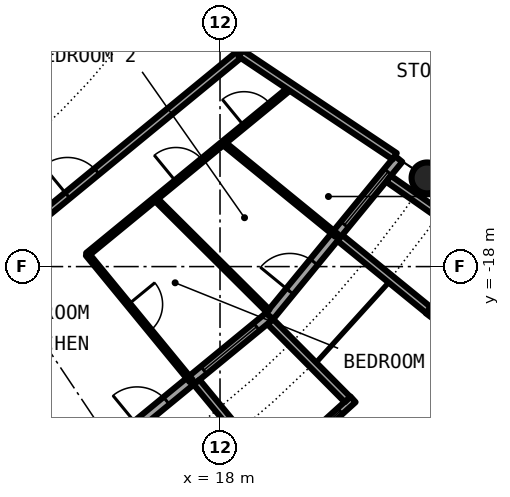
"""IFC4 building model, lengths in metres.
Left out: names, types, materials, properties, quantities, classifications, styles, units other than length and angle.
Written with IfcOpenShell. Run it as: python <this file> out.ifc"""

import sys

from ifc_helpers import new_model, si_unit, direction, frame, frame_2d, origin, origin_2d, place, context, subcontext, project, spatial, rectangle, circle, hollow_circle, extrude, element, fill, save


model = new_model("IFC4")
c1 = context("Model", 3, precision=1e-05, world=origin(), true_north=direction((0.0, 1.0)))
c2 = subcontext(c1, "Body", "Model", "MODEL_VIEW")
j1 = project(units=[si_unit("LENGTHUNIT", "METRE"), si_unit("PLANEANGLEUNIT", "RADIAN")], contexts=[c1])
p1 = place(None, origin())
s1 = spatial("IfcSite", under=j1, at=p1, CompositionType="ELEMENT")
p2 = place(p1, origin())
s2 = spatial("IfcBuilding", under=s1, at=p2, CompositionType="ELEMENT")
p3 = place(p2, frame((0.0, 0.0, 196.3)))
s3 = spatial("IfcBuildingStorey", under=s2, at=p3, CompositionType="ELEMENT", Elevation=196.3)
p4 = place(p3, frame((23.448, -15.667, 0.0), z_axis=(0.0, 0.0, 1.0), x_axis=(1.0, 0.0, 0.0)))
e1 = element("IfcColumn", 1, at=p4, inside=s3, PredefinedType="COLUMN", context=c2, shape_type="SweptSolid", body=[
    extrude(hollow_circle(Radius=0.406, WallThickness=0.03, at=origin_2d()), origin(), (0.0, 0.0, 1.0), 3.05),
])
p5 = place(p3, frame((15.167, -22.699, 0.0), z_axis=(0.0, 0.0, 1.0), x_axis=(0.773019449054, 0.634382322723, 0.0)))
e2 = element("IfcWall", 2, at=p5, inside=s3, PredefinedType="SOLIDWALL", context=c2, shape_type="SweptSolid", body=[
    extrude(rectangle(XDim=5.352, YDim=0.25, at=frame_2d((2.676, 0.0))), origin(), (0.0, 0.0, 1.0), 2.7),
])
p6 = place(p5, frame((0.841, 0.0, 0.0)))
e3 = element("IfcOpeningElement", 3, at=p6, cuts=e2, PredefinedType="OPENING", context=c2, shape_type="SweptSolid", body=[
    extrude(rectangle(XDim=1.0, YDim=2.2, at=frame_2d((0.5, 1.1))), frame((0.0, 0.135, 0.0), z_axis=(0.0, -1.0, 0.0), x_axis=(1.0, 0.0, 0.0)), (0.0, 0.0, 1.0), 0.27),
])
p7 = place(p5, frame((3.111, 0.0, 0.3)))
e4 = element("IfcOpeningElement", 4, at=p7, cuts=e2, PredefinedType="OPENING", context=c2, shape_type="SweptSolid", body=[
    extrude(rectangle(XDim=1.8, YDim=2.1, at=frame_2d((0.9, 1.05))), frame((0.0, 0.135, 0.0), z_axis=(0.0, -1.0, 0.0), x_axis=(1.0, 0.0, 0.0)), (0.0, 0.0, 1.0), 0.27),
])
p8 = place(p3, frame((19.282, -23.503, -0.03), z_axis=(0.0, 0.0, 1.0), x_axis=(0.740998365753, 0.671506829416, 0.0)))
e5 = element("IfcWall", 5, at=p8, inside=s3, PredefinedType="SOLIDWALL", context=c2, shape_type="SweptSolid", body=[
    extrude(rectangle(XDim=2.993, YDim=0.2, at=frame_2d((1.497, 0.0))), origin(), (0.0, 0.0, 1.0), 2.73),
])
p9 = place(p8, frame((0.457, 0.0, 0.33)))
e6 = element("IfcOpeningElement", 6, at=p9, cuts=e5, PredefinedType="OPENING", context=c2, shape_type="SweptSolid", body=[
    extrude(circle(Radius=1.04, at=frame_2d((1.04, 1.04))), frame((0.0, 0.11, 0.0), z_axis=(0.0, -1.0, 0.0), x_axis=(1.0, 0.0, 0.0)), (0.0, 0.0, 1.0), 0.22),
])
p10 = place(p3, frame((17.384, -21.041, -0.03), z_axis=(0.0, 0.0, 1.0), x_axis=(0.63709551667, -0.770784861449, 0.0)))
e7 = element("IfcWall", 7, at=p10, inside=s3, PredefinedType="SOLIDWALL", context=c2, shape_type="SweptSolid", body=[
    extrude(rectangle(XDim=3.006, YDim=0.2, at=frame_2d((1.503, 0.0))), origin(), (0.0, 0.0, 1.0), 2.73),
])
p11 = place(p3, frame((19.323, -19.45, -0.03), z_axis=(0.0, 0.0, 1.0), x_axis=(0.704476739375, -0.709727076896, 0.0)))
e8 = element("IfcWall", 8, at=p11, inside=s3, PredefinedType="SOLIDWALL", context=c2, shape_type="SweptSolid", body=[
    extrude(rectangle(XDim=2.883, YDim=0.2, at=frame_2d((1.441, 0.0))), origin(), (0.0, 0.0, 1.0), 2.73),
])
p12 = place(p3, frame((19.304, -19.304, 0.0), z_axis=(0.0, 0.0, 1.0), x_axis=(0.634382322723, 0.773019449054, 0.0)))
e9 = element("IfcWall", 9, at=p12, inside=s3, PredefinedType="SOLIDWALL", context=c2, shape_type="SweptSolid", body=[
    extrude(rectangle(XDim=5.352, YDim=0.25, at=frame_2d((2.676, 0.0))), origin(), (0.0, 0.0, 1.0), 2.7),
])
p13 = place(p12, frame((0.841, 0.0, 0.0)))
e10 = element("IfcOpeningElement", 10, at=p13, cuts=e9, PredefinedType="OPENING", context=c2, shape_type="SweptSolid", body=[
    extrude(rectangle(XDim=1.0, YDim=2.2, at=frame_2d((0.5, 1.1))), frame((0.0, 0.135, 0.0), z_axis=(0.0, -1.0, 0.0), x_axis=(1.0, 0.0, 0.0)), (0.0, 0.0, 1.0), 0.27),
])
p14 = place(p12, frame((3.111, 0.0, 0.3)))
e11 = element("IfcOpeningElement", 11, at=p14, cuts=e9, PredefinedType="OPENING", context=c2, shape_type="SweptSolid", body=[
    extrude(rectangle(XDim=1.8, YDim=2.1, at=frame_2d((0.9, 1.05))), frame((0.0, 0.135, 0.0), z_axis=(0.0, -1.0, 0.0), x_axis=(1.0, 0.0, 0.0)), (0.0, 0.0, 1.0), 0.27),
])
p15 = place(p3, frame((23.497, -19.289, -0.03), z_axis=(0.0, 0.0, 1.0), x_axis=(0.602806268067, 0.797887588059, 0.0)))
e12 = element("IfcWall", 12, at=p15, inside=s3, PredefinedType="SOLIDWALL", context=c2, shape_type="SweptSolid", body=[
    extrude(rectangle(XDim=2.447, YDim=0.2, at=frame_2d((1.223, 0.0))), origin(), (0.0, 0.0, 1.0), 2.73),
])
p16 = place(p15, frame((0.183, 0.0, 0.33)))
e13 = element("IfcOpeningElement", 13, at=p16, cuts=e12, PredefinedType="OPENING", context=c2, shape_type="SweptSolid", body=[
    extrude(circle(Radius=1.04, at=frame_2d((1.04, 1.04))), frame((0.0, 0.11, 0.0), z_axis=(0.0, -1.0, 0.0), x_axis=(1.0, 0.0, 0.0)), (0.0, 0.0, 1.0), 0.22),
])
p17 = place(p3, frame((21.155, -17.246, -0.03), z_axis=(0.0, 0.0, 1.0), x_axis=(0.775179004516, -0.631741648902, 0.0)))
e14 = element("IfcWall", 14, at=p17, inside=s3, PredefinedType="SOLIDWALL", context=c2, shape_type="SweptSolid", body=[
    extrude(rectangle(XDim=3.006, YDim=0.2, at=frame_2d((1.503, 0.0))), origin(), (0.0, 0.0, 1.0), 2.73),
])
p18 = place(p3, frame((22.433, -15.688, -0.03), z_axis=(0.0, 0.0, 1.0), x_axis=(0.819373043115, -0.573260687834, 0.0)))
e15 = element("IfcWall", 15, at=p18, inside=s3, PredefinedType="SOLIDWALL", context=c2, shape_type="SweptSolid", body=[
    extrude(rectangle(XDim=2.925, YDim=0.2, at=frame_2d((1.463, 0.0))), origin(), (0.0, 0.0, 1.0), 2.73),
])
p19 = place(p3, frame((14.508, -17.681, 0.0), z_axis=(0.0, 0.0, 1.0), x_axis=(0.773155647559, 0.634216323227, 0.0)))
e16 = element("IfcWall", 16, at=p19, inside=s3, PredefinedType="PARTITIONING", context=c2, shape_type="SweptSolid", body=[
    extrude(rectangle(XDim=6.939, YDim=0.1, at=frame_2d((3.469, 0.0))), origin(), (0.0, 0.0, 1.0), 2.7),
])
p20 = place(p19, frame((3.019, 0.0, 0.0)))
e17 = element("IfcOpeningElement", 17, at=p20, cuts=e16, PredefinedType="OPENING", context=c2, shape_type="SweptSolid", body=[
    extrude(rectangle(XDim=0.9, YDim=2.3, at=frame_2d((0.45, 1.15))), frame((0.0, 0.06, 0.0), z_axis=(0.0, -1.0, 0.0), x_axis=(1.0, 0.0, 0.0)), (0.0, 0.0, 1.0), 0.12),
])
p21 = place(p19, frame((5.334, 0.0, 0.0)))
e18 = element("IfcOpeningElement", 18, at=p21, cuts=e16, PredefinedType="OPENING", context=c2, shape_type="SweptSolid", body=[
    extrude(rectangle(XDim=0.9, YDim=2.3, at=frame_2d((0.45, 1.15))), frame((0.0, 0.06, 0.0), z_axis=(0.0, -1.0, 0.0), x_axis=(1.0, 0.0, 0.0)), (0.0, 0.0, 1.0), 0.12),
])
p22 = place(p3, frame((18.542, -12.389, 0.0), z_axis=(0.0, 0.0, 1.0), x_axis=(0.465359652486, 0.885121683068, 0.0)))
e19 = element("IfcWall", 19, at=p22, inside=s3, PredefinedType="PARTITIONING", context=c2, shape_type="SweptSolid", body=[
    extrude(rectangle(XDim=1.665, YDim=0.2, at=frame_2d((0.833, 0.0))), origin(), (0.0, 0.0, 1.0), 2.7),
])
p23 = place(p3, frame((8.534, -20.603, 0.0), z_axis=(0.0, 0.0, 1.0), x_axis=(0.772983503654, 0.634426121056, 0.0)))
e20 = element("IfcWall", 20, at=p23, inside=s3, PredefinedType="PARTITIONING", context=c2, shape_type="SweptSolid", body=[
    extrude(rectangle(XDim=12.947, YDim=0.2, at=frame_2d((6.474, 0.0))), origin(), (0.0, 0.0, 1.0), 2.7),
])
p24 = place(p23, frame((7.053, 0.0, 0.0)))
e21 = element("IfcOpeningElement", 21, at=p24, cuts=e20, PredefinedType="OPENING", context=c2, shape_type="SweptSolid", body=[
    extrude(rectangle(XDim=1.0, YDim=2.3, at=frame_2d((0.5, 1.15))), frame((0.0, 0.11, 0.0), z_axis=(0.0, -1.0, 0.0), x_axis=(1.0, 0.0, 0.0)), (0.0, 0.0, 1.0), 0.22),
])
p25 = place(p3, frame((6.773, -16.353, 0.0), z_axis=(0.0, 0.0, 1.0), x_axis=(0.773034536097, 0.634363938131, 0.0)))
e22 = element("IfcWall", 22, at=p25, inside=s3, PredefinedType="PARTITIONING", context=c2, shape_type="SweptSolid", body=[
    extrude(rectangle(XDim=10.277, YDim=0.2, at=frame_2d((5.138, 0.0))), origin(), (0.0, 0.0, 1.0), 2.7),
])
p26 = place(p25, frame((4.638, 0.0, 0.0)))
e23 = element("IfcOpeningElement", 23, at=p26, cuts=e22, PredefinedType="OPENING", context=c2, shape_type="SweptSolid", body=[
    extrude(rectangle(XDim=1.0, YDim=2.3, at=frame_2d((0.5, 1.15))), frame((0.0, 0.11, 0.0), z_axis=(0.0, -1.0, 0.0), x_axis=(1.0, 0.0, 0.0)), (0.0, 0.0, 1.0), 0.22),
])
p27 = place(p3, frame((14.509, -17.679, 0.0), z_axis=(0.0, 0.0, 1.0), x_axis=(0.634342681687, -0.77305197897, 0.0)))
e24 = element("IfcWall", 24, at=p27, inside=s3, PredefinedType="PARTITIONING", context=c2, shape_type="SweptSolid", body=[
    extrude(rectangle(XDim=4.305, YDim=0.1, at=frame_2d((2.153, 0.0))), origin(), (0.0, 0.0, 1.0), 2.7),
])
p28 = place(p27, frame((1.703, 0.0, 0.0)))
e25 = element("IfcOpeningElement", 25, at=p28, cuts=e24, PredefinedType="OPENING", context=c2, shape_type="SweptSolid", body=[
    extrude(rectangle(XDim=0.9, YDim=2.3, at=frame_2d((0.45, 1.15))), frame((0.0, 0.06, 0.0), z_axis=(0.0, -1.0, 0.0), x_axis=(1.0, 0.0, 0.0)), (0.0, 0.0, 1.0), 0.12),
])
p29 = place(p3, frame((16.296, -16.213, 0.0), z_axis=(0.0, 0.0, 1.0), x_axis=(0.708999026534, -0.705209458511, 0.0)))
e26 = element("IfcWall", 26, at=p29, inside=s3, PredefinedType="PARTITIONING", context=c2, shape_type="SweptSolid", body=[
    extrude(rectangle(XDim=4.188, YDim=0.1, at=frame_2d((2.094, 0.0))), origin(), (0.0, 0.0, 1.0), 2.7),
])
p30 = place(p3, frame((18.084, -14.745, 0.0), z_axis=(0.0, 0.0, 1.0), x_axis=(0.77495020745, -0.632022290724, 0.0)))
e27 = element("IfcWall", 27, at=p30, inside=s3, PredefinedType="PARTITIONING", context=c2, shape_type="SweptSolid", body=[
    extrude(rectangle(XDim=3.842, YDim=0.1, at=frame_2d((1.921, 0.0))), origin(), (0.0, 0.0, 1.0), 2.7),
])
p31 = place(p3, frame((18.542, -12.389, 0.0), z_axis=(0.0, 0.0, 1.0), x_axis=(0.831387096605, -0.55569370664, 0.0)))
e28 = element("IfcWall", 28, at=p31, inside=s3, PredefinedType="PARTITIONING", context=c2, shape_type="SweptSolid", body=[
    extrude(rectangle(XDim=4.875, YDim=0.2, at=frame_2d((2.438, 0.0))), origin(), (0.0, 0.0, 1.0), 2.7),
])
p32 = place(p6, origin())
e29 = element("IfcDoor", 29, at=p32, inside=s3, OperationType="SINGLE_SWING_LEFT", PredefinedType="DOOR", context=c2, shape_type="SweptSolid", body=[
    extrude(rectangle(XDim=1.0, YDim=2.2, at=frame_2d((0.5, 1.1))), frame((0.0, 0.025, 0.0), z_axis=(0.0, -1.0, 0.0), x_axis=(1.0, 0.0, 0.0)), (0.0, 0.0, 1.0), 0.05),
])
fill(e3, e29)
p33 = place(p7, origin())
e30 = element("IfcWindow", 30, at=p33, inside=s3, PartitioningType="SINGLE_PANEL", PredefinedType="WINDOW", context=c2, shape_type="SweptSolid", body=[
    extrude(rectangle(XDim=1.8, YDim=2.1, at=frame_2d((0.9, 1.05))), frame((0.0, 0.03, 0.0), z_axis=(0.0, -1.0, 0.0), x_axis=(1.0, 0.0, 0.0)), (0.0, 0.0, 1.0), 0.06),
])
fill(e4, e30)
p34 = place(p9, origin())
e31 = element("IfcWindow", 31, at=p34, inside=s3, PartitioningType="SINGLE_PANEL", PredefinedType="WINDOW", context=c2, shape_type="SweptSolid", body=[
    extrude(circle(Radius=1.04, at=frame_2d((1.04, 1.04))), frame((0.0, 0.03, 0.0), z_axis=(0.0, -1.0, 0.0), x_axis=(1.0, 0.0, 0.0)), (0.0, 0.0, 1.0), 0.06),
])
fill(e6, e31)
p35 = place(p13, origin())
e32 = element("IfcDoor", 32, at=p35, inside=s3, OperationType="SINGLE_SWING_LEFT", PredefinedType="DOOR", context=c2, shape_type="SweptSolid", body=[
    extrude(rectangle(XDim=1.0, YDim=2.2, at=frame_2d((0.5, 1.1))), frame((0.0, 0.025, 0.0), z_axis=(0.0, -1.0, 0.0), x_axis=(1.0, 0.0, 0.0)), (0.0, 0.0, 1.0), 0.05),
])
fill(e10, e32)
p36 = place(p14, origin())
e33 = element("IfcWindow", 33, at=p36, inside=s3, PartitioningType="SINGLE_PANEL", PredefinedType="WINDOW", context=c2, shape_type="SweptSolid", body=[
    extrude(rectangle(XDim=1.8, YDim=2.1, at=frame_2d((0.9, 1.05))), frame((0.0, 0.03, 0.0), z_axis=(0.0, -1.0, 0.0), x_axis=(1.0, 0.0, 0.0)), (0.0, 0.0, 1.0), 0.06),
])
fill(e11, e33)
p37 = place(p24, origin())
e34 = element("IfcDoor", 34, at=p37, inside=s3, OperationType="SINGLE_SWING_RIGHT", PredefinedType="DOOR", context=c2, shape_type="SweptSolid", body=[
    extrude(rectangle(XDim=1.0, YDim=2.3, at=frame_2d((0.5, 1.15))), frame((0.0, 0.025, 0.0), z_axis=(0.0, -1.0, 0.0), x_axis=(1.0, 0.0, 0.0)), (0.0, 0.0, 1.0), 0.05),
])
fill(e21, e34)
p38 = place(p28, origin())
e35 = element("IfcDoor", 35, at=p38, inside=s3, OperationType="SINGLE_SWING_RIGHT", PredefinedType="DOOR", context=c2, shape_type="SweptSolid", body=[
    extrude(rectangle(XDim=0.9, YDim=2.3, at=frame_2d((0.45, 1.15))), frame((0.0, 0.025, 0.0), z_axis=(0.0, -1.0, 0.0), x_axis=(1.0, 0.0, 0.0)), (0.0, 0.0, 1.0), 0.05),
])
fill(e25, e35)
p39 = place(p20, origin())
e36 = element("IfcDoor", 36, at=p39, inside=s3, OperationType="SINGLE_SWING_LEFT", PredefinedType="DOOR", context=c2, shape_type="SweptSolid", body=[
    extrude(rectangle(XDim=0.9, YDim=2.3, at=frame_2d((0.45, 1.15))), frame((0.0, 0.025, 0.0), z_axis=(0.0, -1.0, 0.0), x_axis=(1.0, 0.0, 0.0)), (0.0, 0.0, 1.0), 0.05),
])
fill(e17, e36)
p40 = place(p21, origin())
e37 = element("IfcDoor", 37, at=p40, inside=s3, OperationType="SINGLE_SWING_RIGHT", PredefinedType="DOOR", context=c2, shape_type="SweptSolid", body=[
    extrude(rectangle(XDim=0.9, YDim=2.3, at=frame_2d((0.45, 1.15))), frame((0.0, 0.025, 0.0), z_axis=(0.0, -1.0, 0.0), x_axis=(1.0, 0.0, 0.0)), (0.0, 0.0, 1.0), 0.05),
])
fill(e18, e37)
save(model, sys.argv[1])
